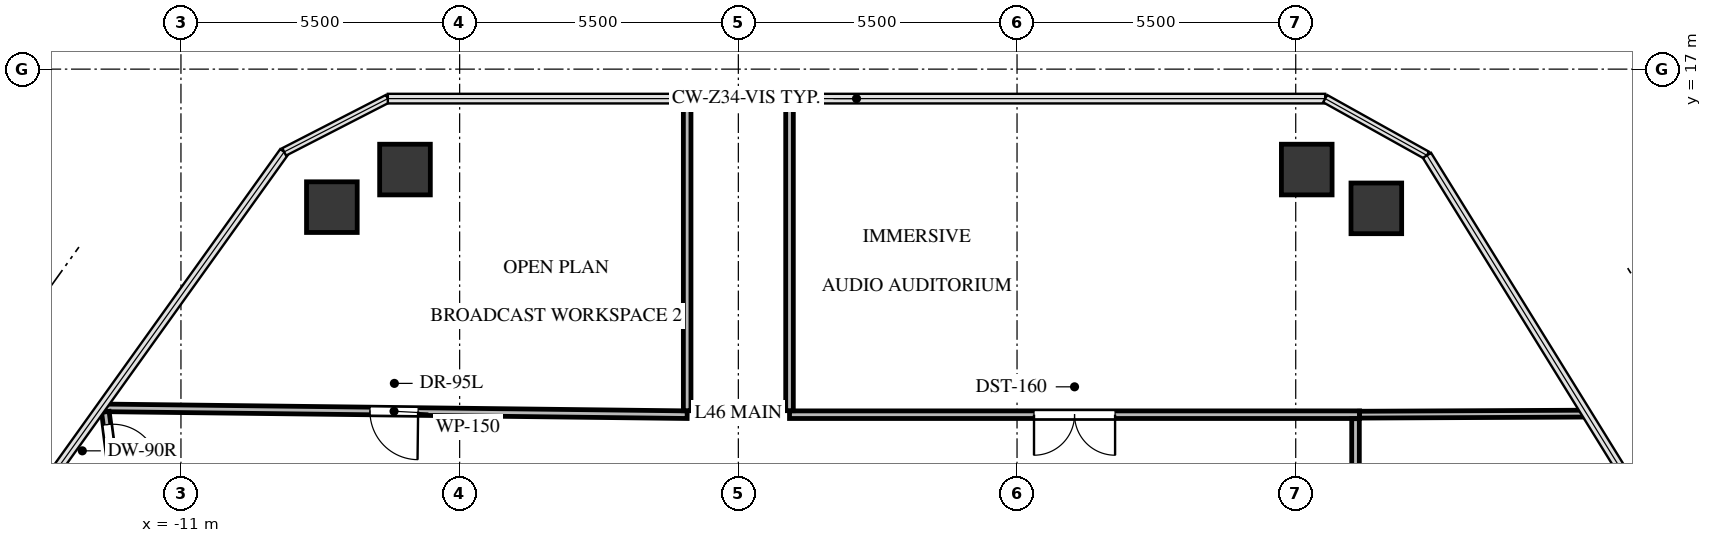
"""IFC4 building model, lengths in metres.
Left out: names, types, materials, properties, quantities, classifications, styles, units other than length and angle.
Written with IfcOpenShell. Run it as: python <this file> out.ifc"""

import sys

from ifc_helpers import new_model, si_unit, direction, frame, frame_2d, origin, origin_2d, place, context, subcontext, project, spatial, rectangle, extrude, source, transform, mapped, element, fill, save


model = new_model("IFC4")
c1 = context("Model", 3, precision=1e-05, world=origin(), true_north=direction((0.0, 1.0)))
c2 = subcontext(c1, "Body", "Model", "MODEL_VIEW")
j1 = project(units=[si_unit("LENGTHUNIT", "METRE"), si_unit("PLANEANGLEUNIT", "RADIAN")], contexts=[c1])
p1 = place(None, origin())
s1 = spatial("IfcSite", under=j1, at=p1, CompositionType="ELEMENT")
p2 = place(p1, origin())
s2 = spatial("IfcBuilding", under=s1, at=p2, CompositionType="ELEMENT")
p3 = place(p2, frame((0.0, 0.0, 170.5)))
s3 = spatial("IfcBuildingStorey", under=s2, at=p3, CompositionType="ELEMENT", Elevation=170.5)
m1 = source(origin(), c2, "Body", "SweptSolid", [
    extrude(rectangle(XDim=1.0, YDim=1.0, at=origin_2d()), origin(), (0.0, 0.0, 1.0), 3.3),
])
for number, where, z_axis, x_axis in (
    (1, (-8.022, 14.276, -0.24), (0.0, 0.0, 1.0), (1.0, 0.0, 0.0)),
    (2, (-6.579, 15.018, -0.24), (0.0, 0.0, 1.0), (1.0, 0.0, 0.0)),
    (3, (11.218, 15.018, -0.24), (0.0, 0.0, 1.0), (1.0, 0.0, 0.0)),
    (4, (12.591, 14.252, -0.24), (0.0, 0.0, 1.0), (1.0, 0.0, 0.0)),
):
    element("IfcColumn", number, at=place(p3, frame(where, z_axis=z_axis, x_axis=x_axis)), inside=s3, PredefinedType="COLUMN", context=c2, shape_type="MappedRepresentation", body=[
        mapped(m1, transform((0.0, 0.0, 0.0), x_axis=(1.0, 0.0, 0.0), y_axis=(0.0, 1.0, 0.0), z_axis=(0.0, 0.0, 1.0), scale=1.0)),
    ])
p4 = place(p3, frame((-1.01, 10.18, 0.0), z_axis=(0.0, 0.0, 1.0), x_axis=(-0.999931176304, 0.011732120664, 0.0)))
e5 = element("IfcWall", 5, at=p4, inside=s3, PredefinedType="PARTITIONING", context=c2, shape_type="SweptSolid", body=[
    extrude(rectangle(XDim=11.57, YDim=0.15, at=frame_2d((5.785, 0.0))), origin(), (0.0, 0.0, 1.0), 2.242),
])
p5 = place(p4, frame((5.31, 0.0, 0.0)))
e6 = element("IfcOpeningElement", 6, at=p5, cuts=e5, PredefinedType="OPENING", context=c2, shape_type="SweptSolid", body=[
    extrude(rectangle(XDim=0.95, YDim=2.1, at=frame_2d((0.475, 1.05))), frame((0.0, 0.085, 0.0), z_axis=(0.0, -1.0, 0.0), x_axis=(1.0, 0.0, 0.0)), (0.0, 0.0, 1.0), 0.17),
])
p6 = place(p3, frame((-1.01, 16.418, 0.0), z_axis=(0.0, 0.0, 1.0), x_axis=(0.0, -1.0, 0.0)))
e7 = element("IfcWall", 7, at=p6, inside=s3, PredefinedType="PARTITIONING", context=c2, shape_type="SweptSolid", body=[
    extrude(rectangle(XDim=6.159, YDim=0.15, at=frame_2d((3.08, 0.0))), origin(), (0.0, 0.0, 1.0), 2.399),
])
p7 = place(p3, frame((12.26, 10.18, 0.0), z_axis=(0.0, 0.0, 1.0), x_axis=(-1.0, 0.0, 0.0)))
e8 = element("IfcWall", 8, at=p7, inside=s3, PredefinedType="PARTITIONING", context=c2, shape_type="SweptSolid", body=[
    extrude(rectangle(XDim=11.25, YDim=0.15, at=frame_2d((5.625, 0.0))), origin(), (0.0, 0.0, 1.0), 2.242),
])
p8 = place(p7, frame((4.825, 0.0, 0.0)))
e9 = element("IfcOpeningElement", 9, at=p8, cuts=e8, PredefinedType="OPENING", context=c2, shape_type="SweptSolid", body=[
    extrude(rectangle(XDim=1.6, YDim=2.15, at=frame_2d((0.8, 1.075))), frame((0.0, 0.085, 0.0), z_axis=(0.0, -1.0, 0.0), x_axis=(1.0, 0.0, 0.0)), (0.0, 0.0, 1.0), 0.17),
])
p9 = place(p3, frame((1.01, 10.259, 0.0), z_axis=(0.0, 0.0, 1.0), x_axis=(0.0, 1.0, 0.0)))
e10 = element("IfcWall", 10, at=p9, inside=s3, PredefinedType="PARTITIONING", context=c2, shape_type="SweptSolid", body=[
    extrude(rectangle(XDim=6.159, YDim=0.15, at=frame_2d((3.08, 0.0))), origin(), (0.0, 0.0, 1.0), 2.399),
])
p10 = place(p3, frame((-12.492, 10.236, 0.0), z_axis=(0.0, 0.0, 1.0), x_axis=(0.129413346452, -0.991590735011, 0.0)))
e11 = element("IfcWall", 11, at=p10, inside=s3, PredefinedType="PARTITIONING", context=c2, shape_type="SweptSolid", body=[
    extrude(rectangle(XDim=1.407, YDim=0.15, at=frame_2d((0.704, 0.0))), origin(), (0.0, 0.0, 1.0), 3.045),
])
p11 = place(p10, frame((0.254, 0.0, 0.0)))
e12 = element("IfcOpeningElement", 12, at=p11, cuts=e11, PredefinedType="OPENING", context=c2, shape_type="SweptSolid", body=[
    extrude(rectangle(XDim=0.9, YDim=2.05, at=frame_2d((0.45, 1.025))), frame((0.0, 0.085, 0.0), z_axis=(0.0, -1.0, 0.0), x_axis=(1.0, 0.0, 0.0)), (0.0, 0.0, 1.0), 0.17),
])
p12 = place(p3, frame((12.18, 2.49, 0.0), z_axis=(0.0, 0.0, 1.0), x_axis=(0.0, 1.0, 0.0)))
e13 = element("IfcWall", 13, at=p12, inside=s3, PredefinedType="PARTITIONING", context=c2, shape_type="SweptSolid", body=[
    extrude(rectangle(XDim=7.611, YDim=0.15, at=frame_2d((3.806, 0.0))), origin(), (0.0, 0.0, 1.0), 3.045),
])
p13 = place(p12, frame((0.35, 0.0, 0.0)))
e14 = element("IfcOpeningElement", 14, at=p13, cuts=e13, PredefinedType="OPENING", context=c2, shape_type="SweptSolid", body=[
    extrude(rectangle(XDim=1.6, YDim=2.15, at=frame_2d((0.8, 1.075))), frame((0.0, 0.085, 0.0), z_axis=(0.0, -1.0, 0.0), x_axis=(1.0, 0.0, 0.0)), (0.0, 0.0, 1.0), 0.17),
])
p14 = place(p3, frame((16.74, 10.201, 0.0), z_axis=(0.0, 0.0, 1.0), x_axis=(-0.999989522694, -0.004577608714, 0.0)))
e15 = element("IfcWall", 15, at=p14, inside=s3, PredefinedType="PARTITIONING", context=c2, shape_type="SweptSolid", body=[
    extrude(rectangle(XDim=4.48, YDim=0.135, at=frame_2d((2.24, 0.0))), origin(), (0.0, 0.0, 1.0), 2.399),
])
m2 = source(origin(), c2, "Body", "SweptSolid", [
    extrude(rectangle(XDim=0.95, YDim=2.1, at=frame_2d((0.475, 1.05))), frame((0.0, 0.025, 0.0), z_axis=(0.0, -1.0, 0.0), x_axis=(1.0, 0.0, 0.0)), (0.0, 0.0, 1.0), 0.05),
])
p15 = place(p5, origin())
e16 = element("IfcDoor", 16, at=p15, inside=s3, OperationType="SINGLE_SWING_LEFT", PredefinedType="DOOR", context=c2, shape_type="MappedRepresentation", body=[
    mapped(m2, transform((0.0, 0.0, 0.0), x_axis=(1.0, 0.0, 0.0), y_axis=(0.0, 1.0, 0.0), z_axis=(0.0, 0.0, 1.0), scale=1.0)),
])
fill(e6, e16)
m3 = source(origin(), c2, "Body", "SweptSolid", [
    extrude(rectangle(XDim=1.6, YDim=2.15, at=frame_2d((0.8, 1.075))), frame((0.0, 0.025, 0.0), z_axis=(0.0, -1.0, 0.0), x_axis=(1.0, 0.0, 0.0)), (0.0, 0.0, 1.0), 0.05),
])
p16 = place(p8, origin())
e17 = element("IfcDoor", 17, at=p16, inside=s3, OperationType="DOUBLE_DOOR_SINGLE_SWING", PredefinedType="DOOR", context=c2, shape_type="MappedRepresentation", body=[
    mapped(m3, transform((0.0, 0.0, 0.0), x_axis=(1.0, 0.0, 0.0), y_axis=(0.0, 1.0, 0.0), z_axis=(0.0, 0.0, 1.0), scale=1.0)),
])
fill(e9, e17)
m4 = source(origin(), c2, "Body", "SweptSolid", [
    extrude(rectangle(XDim=0.9, YDim=2.05, at=frame_2d((0.45, 1.025))), frame((0.0, 0.025, 0.0), z_axis=(0.0, -1.0, 0.0), x_axis=(1.0, 0.0, 0.0)), (0.0, 0.0, 1.0), 0.05),
])
p17 = place(p11, origin())
e18 = element("IfcDoor", 18, at=p17, inside=s3, OperationType="SINGLE_SWING_RIGHT", PredefinedType="DOOR", context=c2, shape_type="MappedRepresentation", body=[
    mapped(m4, transform((0.0, 0.0, 0.0), x_axis=(1.0, 0.0, 0.0), y_axis=(0.0, 1.0, 0.0), z_axis=(0.0, 0.0, 1.0), scale=1.0)),
])
fill(e12, e18)
save(model, sys.argv[1])
